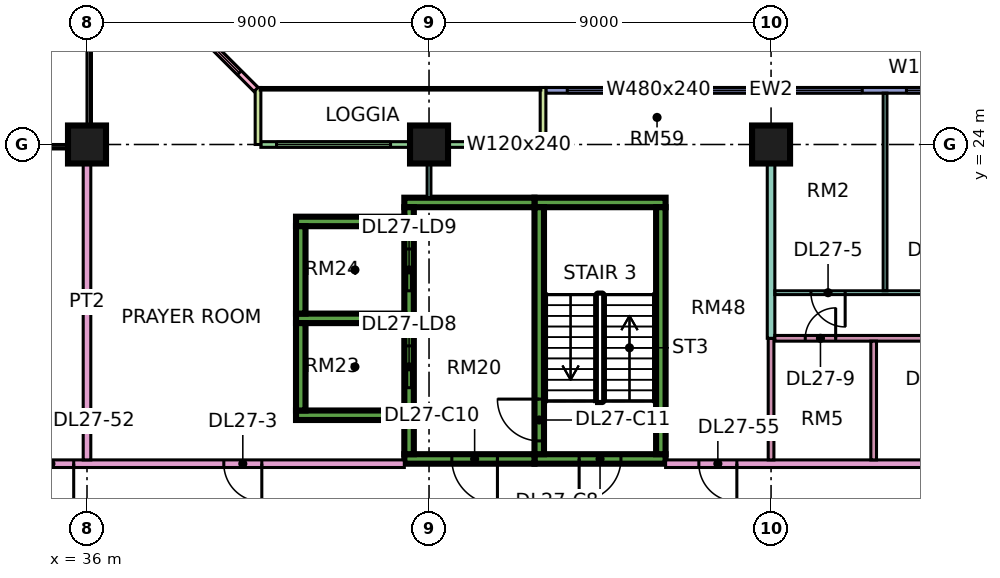
"""IFC4 building model, lengths in metres.
Left out: names, types, materials, properties, quantities, classifications, styles, units other than length and angle.
Written with IfcOpenShell. Run it as: python <this file> out.ifc"""

import sys

from ifc_helpers import new_model, si_unit, direction, frame, frame_2d, origin, origin_2d, place, context, subcontext, project, spatial, rectangle, extrude, element, fill, save


model = new_model("IFC4")
c1 = context("Model", 3, precision=1e-05, world=origin(), true_north=direction((0.0, 1.0)))
c2 = subcontext(c1, "Body", "Model", "MODEL_VIEW")
j1 = project(units=[si_unit("LENGTHUNIT", "METRE"), si_unit("PLANEANGLEUNIT", "RADIAN")], contexts=[c1])
p1 = place(None, origin())
s1 = spatial("IfcSite", under=j1, at=p1, CompositionType="ELEMENT")
p2 = place(p1, origin())
s2 = spatial("IfcBuilding", under=s1, at=p2, CompositionType="ELEMENT")
p3 = place(p2, frame((0.0, 0.0, 118.15)))
s3 = spatial("IfcBuildingStorey", under=s2, at=p3, CompositionType="ELEMENT", Elevation=118.15)
for number, where, z_axis, x_axis in (
    (1, (36.0, 24.0, 0.0), (0.0, 0.0, 1.0), (1.0, 0.0, 0.0)),
    (2, (45.0, 24.0, 0.0), (0.0, 0.0, 1.0), (1.0, 0.0, 0.0)),
    (3, (54.0, 24.0, 0.0), (0.0, 0.0, 1.0), (1.0, 0.0, 0.0)),
):
    element("IfcColumn", number, at=place(p3, frame(where, z_axis=z_axis, x_axis=x_axis)), inside=s3, PredefinedType="COLUMN", context=c2, shape_type="SweptSolid", body=[
        extrude(rectangle(XDim=1.0, YDim=1.0, at=origin_2d()), origin(), (0.0, 0.0, 1.0), 3.75),
    ])
p4 = place(p3, frame((47.775, 15.725, 0.0), z_axis=(0.0, 0.0, 1.0), x_axis=(1.0, 0.0, 0.0)))
e4 = element("IfcWall", 4, at=p4, inside=s3, PredefinedType="SHEAR", context=c2, shape_type="SweptSolid", body=[
    extrude(rectangle(XDim=3.45, YDim=0.25, at=frame_2d((1.725, 0.0))), origin(), (0.0, 0.0, 1.0), 3.75),
])
p5 = place(p4, frame((1.175, 0.0, 0.0)))
e5 = element("IfcOpeningElement", 5, at=p5, cuts=e4, PredefinedType="OPENING", context=c2, shape_type="SweptSolid", body=[
    extrude(rectangle(XDim=1.1, YDim=2.2, at=frame_2d((0.55, 1.1))), frame((0.0, 0.135, 0.0), z_axis=(0.0, -1.0, 0.0), x_axis=(1.0, 0.0, 0.0)), (0.0, 0.0, 1.0), 0.27),
])
p6 = place(p3, frame((47.775, 22.475, 0.0), z_axis=(0.0, 0.0, 1.0), x_axis=(1.0, 0.0, 0.0)))
e6 = element("IfcWall", 6, at=p6, inside=s3, PredefinedType="SHEAR", context=c2, shape_type="SweptSolid", body=[
    extrude(rectangle(XDim=3.45, YDim=0.25, at=frame_2d((1.725, 0.0))), origin(), (0.0, 0.0, 1.0), 3.75),
])
p7 = place(p3, frame((47.9, 15.85, 0.0), z_axis=(0.0, 0.0, 1.0), x_axis=(0.0, 1.0, 0.0)))
e7 = element("IfcWall", 7, at=p7, inside=s3, PredefinedType="SHEAR", context=c2, shape_type="SweptSolid", body=[
    extrude(rectangle(XDim=6.5, YDim=0.25, at=frame_2d((3.25, 0.0))), origin(), (0.0, 0.0, 1.0), 3.75),
])
p8 = place(p7, frame((0.35, 0.0, 0.0)))
e8 = element("IfcOpeningElement", 8, at=p8, cuts=e7, PredefinedType="OPENING", context=c2, shape_type="SweptSolid", body=[
    extrude(rectangle(XDim=1.1, YDim=2.2, at=frame_2d((0.55, 1.1))), frame((0.0, 0.135, 0.0), z_axis=(0.0, -1.0, 0.0), x_axis=(1.0, 0.0, 0.0)), (0.0, 0.0, 1.0), 0.27),
])
p9 = place(p3, frame((51.1, 15.85, 0.0), z_axis=(0.0, 0.0, 1.0), x_axis=(0.0, 1.0, 0.0)))
e9 = element("IfcWall", 9, at=p9, inside=s3, PredefinedType="SHEAR", context=c2, shape_type="SweptSolid", body=[
    extrude(rectangle(XDim=6.5, YDim=0.25, at=frame_2d((3.25, 0.0))), origin(), (0.0, 0.0, 1.0), 3.75),
])
p10 = place(p3, frame((44.35, 15.725, 0.0), z_axis=(0.0, 0.0, 1.0), x_axis=(1.0, 0.0, 0.0)))
e10 = element("IfcWall", 10, at=p10, inside=s3, PredefinedType="SHEAR", context=c2, shape_type="SweptSolid", body=[
    extrude(rectangle(XDim=3.425, YDim=0.25, at=frame_2d((1.712, 0.0))), origin(), (0.0, 0.0, 1.0), 3.75),
])
p11 = place(p10, frame((1.25, 0.0, 0.0)))
e11 = element("IfcOpeningElement", 11, at=p11, cuts=e10, PredefinedType="OPENING", context=c2, shape_type="SweptSolid", body=[
    extrude(rectangle(XDim=1.2, YDim=2.2, at=frame_2d((0.6, 1.1))), frame((0.0, 0.135, 0.0), z_axis=(0.0, -1.0, 0.0), x_axis=(1.0, 0.0, 0.0)), (0.0, 0.0, 1.0), 0.27),
])
p12 = place(p3, frame((44.35, 22.475, 0.0), z_axis=(0.0, 0.0, 1.0), x_axis=(1.0, 0.0, 0.0)))
e12 = element("IfcWall", 12, at=p12, inside=s3, PredefinedType="SHEAR", context=c2, shape_type="SweptSolid", body=[
    extrude(rectangle(XDim=3.425, YDim=0.25, at=frame_2d((1.712, 0.0))), origin(), (0.0, 0.0, 1.0), 3.75),
])
p13 = place(p3, frame((44.475, 15.85, 0.0), z_axis=(0.0, 0.0, 1.0), x_axis=(0.0, 1.0, 0.0)))
e13 = element("IfcWall", 13, at=p13, inside=s3, PredefinedType="SHEAR", context=c2, shape_type="SweptSolid", body=[
    extrude(rectangle(XDim=6.5, YDim=0.25, at=frame_2d((3.25, 0.0))), origin(), (0.0, 0.0, 1.0), 3.75),
])
p14 = place(p13, frame((1.75, 0.0, 0.0)))
e14 = element("IfcOpeningElement", 14, at=p14, cuts=e13, PredefinedType="OPENING", context=c2, shape_type="SweptSolid", body=[
    extrude(rectangle(XDim=1.1, YDim=2.2, at=frame_2d((0.55, 1.1))), frame((0.0, 0.135, 0.0), z_axis=(0.0, -1.0, 0.0), x_axis=(1.0, 0.0, 0.0)), (0.0, 0.0, 1.0), 0.27),
])
p15 = place(p13, frame((4.3, 0.0, 0.0)))
e15 = element("IfcOpeningElement", 15, at=p15, cuts=e13, PredefinedType="OPENING", context=c2, shape_type="SweptSolid", body=[
    extrude(rectangle(XDim=1.1, YDim=2.2, at=frame_2d((0.55, 1.1))), frame((0.0, 0.135, 0.0), z_axis=(0.0, -1.0, 0.0), x_axis=(1.0, 0.0, 0.0)), (0.0, 0.0, 1.0), 0.27),
])
for number, where, z_axis, x_axis in (
    (16, (41.5, 16.875, 0.0), (0.0, 0.0, 1.0), (1.0, 0.0, 0.0)),
    (17, (41.5, 19.425, 0.0), (0.0, 0.0, 1.0), (1.0, 0.0, 0.0)),
    (18, (41.5, 21.975, 0.0), (0.0, 0.0, 1.0), (1.0, 0.0, 0.0)),
):
    element("IfcWall", number, at=place(p3, frame(where, z_axis=z_axis, x_axis=x_axis)), inside=s3, PredefinedType="SHEAR", context=c2, shape_type="SweptSolid", body=[
        extrude(rectangle(XDim=2.85, YDim=0.25, at=frame_2d((1.425, 0.0))), origin(), (0.0, 0.0, 1.0), 3.75),
    ])
for number, where, z_axis, x_axis in (
    (19, (41.625, 17.0, 0.0), (0.0, 0.0, 1.0), (0.0, 1.0, 0.0)),
    (20, (41.625, 19.55, 0.0), (0.0, 0.0, 1.0), (0.0, 1.0, 0.0)),
):
    element("IfcWall", number, at=place(p3, frame(where, z_axis=z_axis, x_axis=x_axis)), inside=s3, PredefinedType="SHEAR", context=c2, shape_type="SweptSolid", body=[
        extrude(rectangle(XDim=2.3, YDim=0.25, at=frame_2d((1.15, 0.0))), origin(), (0.0, 0.0, 1.0), 3.75),
    ])
p16 = place(p3, frame((59.925, 25.425, 0.0), z_axis=(0.0, 0.0, 1.0), x_axis=(-1.0, 0.0, 0.0)))
e21 = element("IfcWall", 21, at=p16, inside=s3, PredefinedType="SOLIDWALL", context=c2, shape_type="SweptSolid", body=[
    extrude(rectangle(XDim=11.85, YDim=0.15, at=frame_2d((5.925, 0.0))), origin(), (0.0, 0.0, 1.0), 3.35),
])
p17 = place(p16, frame((0.562, 0.0, 0.45)))
e22 = element("IfcOpeningElement", 22, at=p17, cuts=e21, PredefinedType="OPENING", context=c2, shape_type="SweptSolid", body=[
    extrude(rectangle(XDim=1.8, YDim=2.4, at=frame_2d((0.9, 1.2))), frame((0.0, 0.085, 0.0), z_axis=(0.0, -1.0, 0.0), x_axis=(1.0, 0.0, 0.0)), (0.0, 0.0, 1.0), 0.17),
])
p18 = place(p16, frame((3.525, 0.0, 0.45)))
e23 = element("IfcOpeningElement", 23, at=p18, cuts=e21, PredefinedType="OPENING", context=c2, shape_type="SweptSolid", body=[
    extrude(rectangle(XDim=1.8, YDim=2.4, at=frame_2d((0.9, 1.2))), frame((0.0, 0.085, 0.0), z_axis=(0.0, -1.0, 0.0), x_axis=(1.0, 0.0, 0.0)), (0.0, 0.0, 1.0), 0.17),
])
p19 = place(p16, frame((6.488, 0.0, 0.45)))
e24 = element("IfcOpeningElement", 24, at=p19, cuts=e21, PredefinedType="OPENING", context=c2, shape_type="SweptSolid", body=[
    extrude(rectangle(XDim=4.8, YDim=2.4, at=frame_2d((2.4, 1.2))), frame((0.0, 0.085, 0.0), z_axis=(0.0, -1.0, 0.0), x_axis=(1.0, 0.0, 0.0)), (0.0, 0.0, 1.0), 0.17),
])
p20 = place(p3, frame((47.925, 24.0, 0.0), z_axis=(0.0, 0.0, 1.0), x_axis=(-1.0, 0.0, 0.0)))
e25 = element("IfcWall", 25, at=p20, inside=s3, PredefinedType="SOLIDWALL", context=c2, shape_type="SweptSolid", body=[
    extrude(rectangle(XDim=7.35, YDim=0.15, at=frame_2d((3.675, 0.0))), origin(), (0.0, 0.0, 1.0), 3.35),
])
p21 = place(p20, frame((0.562, 0.0, 0.45)))
e26 = element("IfcOpeningElement", 26, at=p21, cuts=e25, PredefinedType="OPENING", context=c2, shape_type="SweptSolid", body=[
    extrude(rectangle(XDim=1.2, YDim=2.4, at=frame_2d((0.6, 1.2))), frame((0.0, 0.085, 0.0), z_axis=(0.0, -1.0, 0.0), x_axis=(1.0, 0.0, 0.0)), (0.0, 0.0, 1.0), 0.17),
])
p22 = place(p20, frame((3.938, 0.0, 0.45)))
e27 = element("IfcOpeningElement", 27, at=p22, cuts=e25, PredefinedType="OPENING", context=c2, shape_type="SweptSolid", body=[
    extrude(rectangle(XDim=3.0, YDim=2.4, at=frame_2d((1.5, 1.2))), frame((0.0, 0.085, 0.0), z_axis=(0.0, -1.0, 0.0), x_axis=(1.0, 0.0, 0.0)), (0.0, 0.0, 1.0), 0.17),
])
for number, where, z_axis, x_axis in (
    (28, (48.0, 25.5, 0.0), (0.0, 0.0, 1.0), (0.0, -1.0, 0.0)),
    (29, (40.5, 25.5, 0.0), (0.0, 0.0, 1.0), (0.0, -1.0, 0.0)),
):
    element("IfcWall", number, at=place(p3, frame(where, z_axis=z_axis, x_axis=x_axis)), inside=s3, PredefinedType="SOLIDWALL", context=c2, shape_type="SweptSolid", body=[
        extrude(rectangle(XDim=1.5, YDim=0.15, at=frame_2d((0.75, 0.0))), origin(), (0.0, 0.0, 1.0), 3.35),
    ])
p23 = place(p3, frame((40.447, 25.447, 0.0), z_axis=(0.0, 0.0, 1.0), x_axis=(-0.707106781187, 0.707106781187, 0.0)))
e30 = element("IfcWall", 30, at=p23, inside=s3, PredefinedType="SOLIDWALL", context=c2, shape_type="SweptSolid", body=[
    extrude(rectangle(XDim=4.243, YDim=0.15, at=frame_2d((2.121, 0.0))), origin(), (0.0, 0.0, 1.0), 3.35),
])
p24 = place(p23, frame((0.621, 0.0, 0.45)))
e31 = element("IfcOpeningElement", 31, at=p24, cuts=e30, PredefinedType="OPENING", context=c2, shape_type="SweptSolid", body=[
    extrude(rectangle(XDim=3.0, YDim=2.4, at=frame_2d((1.5, 1.2))), frame((0.0, 0.085, 0.0), z_axis=(0.0, -1.0, 0.0), x_axis=(1.0, 0.0, 0.0)), (0.0, 0.0, 1.0), 0.17),
])
p25 = place(p3, frame((34.0, 15.6, 0.0), z_axis=(0.0, 0.0, 1.0), x_axis=(1.0, 0.0, 0.0)))
e32 = element("IfcWall", 32, at=p25, inside=s3, PredefinedType="PARTITIONING", context=c2, shape_type="SweptSolid", body=[
    extrude(rectangle(XDim=10.35, YDim=0.2, at=frame_2d((5.175, 0.0))), origin(), (0.0, 0.0, 1.0), 3.35),
])
p26 = place(p25, frame((5.6, 0.0, 0.0)))
e33 = element("IfcOpeningElement", 33, at=p26, cuts=e32, PredefinedType="OPENING", context=c2, shape_type="SweptSolid", body=[
    extrude(rectangle(XDim=1.0, YDim=2.1, at=frame_2d((0.5, 1.05))), frame((0.0, 0.11, 0.0), z_axis=(0.0, -1.0, 0.0), x_axis=(1.0, 0.0, 0.0)), (0.0, 0.0, 1.0), 0.22),
])
p27 = place(p25, frame((0.45, 0.0, 0.0)))
e34 = element("IfcOpeningElement", 34, at=p27, cuts=e32, PredefinedType="OPENING", context=c2, shape_type="SweptSolid", body=[
    extrude(rectangle(XDim=1.2, YDim=2.1, at=frame_2d((0.6, 1.05))), frame((0.0, 0.11, 0.0), z_axis=(0.0, -1.0, 0.0), x_axis=(1.0, 0.0, 0.0)), (0.0, 0.0, 1.0), 0.22),
])
p28 = place(p3, frame((36.0, 15.7, 0.0), z_axis=(0.0, 0.0, 1.0), x_axis=(0.0, 1.0, 0.0)))
e35 = element("IfcWall", 35, at=p28, inside=s3, PredefinedType="PARTITIONING", context=c2, shape_type="SweptSolid", body=[
    extrude(rectangle(XDim=8.3, YDim=0.2, at=frame_2d((4.15, 0.0))), origin(), (0.0, 0.0, 1.0), 3.35),
])
p29 = place(p3, frame((45.0, 22.6, 0.0), z_axis=(0.0, 0.0, 1.0), x_axis=(0.0, 1.0, 0.0)))
e36 = element("IfcWall", 36, at=p29, inside=s3, PredefinedType="PARTITIONING", context=c2, shape_type="SweptSolid", body=[
    extrude(rectangle(XDim=1.326, YDim=0.1, at=frame_2d((0.663, 0.0))), origin(), (0.0, 0.0, 1.0), 3.35),
])
p30 = place(p3, frame((51.225, 15.6, 0.0), z_axis=(0.0, 0.0, 1.0), x_axis=(1.0, 0.0, 0.0)))
e37 = element("IfcWall", 37, at=p30, inside=s3, PredefinedType="PARTITIONING", context=c2, shape_type="SweptSolid", body=[
    extrude(rectangle(XDim=20.701, YDim=0.2, at=frame_2d((10.351, 0.0))), origin(), (0.0, 0.0, 1.0), 3.35),
])
p31 = place(p30, frame((9.725, 0.0, 0.0)))
e38 = element("IfcOpeningElement", 38, at=p31, cuts=e37, PredefinedType="OPENING", context=c2, shape_type="SweptSolid", body=[
    extrude(rectangle(XDim=1.0, YDim=2.1, at=frame_2d((0.5, 1.05))), frame((0.0, 0.11, 0.0), z_axis=(0.0, -1.0, 0.0), x_axis=(1.0, 0.0, 0.0)), (0.0, 0.0, 1.0), 0.22),
])
p32 = place(p30, frame((0.875, 0.0, 0.0)))
e39 = element("IfcOpeningElement", 39, at=p32, cuts=e37, PredefinedType="OPENING", context=c2, shape_type="SweptSolid", body=[
    extrude(rectangle(XDim=1.0, YDim=2.1, at=frame_2d((0.5, 1.05))), frame((0.0, 0.11, 0.0), z_axis=(0.0, -1.0, 0.0), x_axis=(1.0, 0.0, 0.0)), (0.0, 0.0, 1.0), 0.22),
])
p33 = place(p3, frame((54.0, 15.7, 0.0), z_axis=(0.0, 0.0, 1.0), x_axis=(0.0, 1.0, 0.0)))
e40 = element("IfcWall", 40, at=p33, inside=s3, PredefinedType="PARTITIONING", context=c2, shape_type="SweptSolid", body=[
    extrude(rectangle(XDim=3.2, YDim=0.15, at=frame_2d((1.6, 0.0))), origin(), (0.0, 0.0, 1.0), 3.35),
])
p34 = place(p3, frame((54.0, 18.9, 0.0), z_axis=(0.0, 0.0, 1.0), x_axis=(0.0, 1.0, 0.0)))
e41 = element("IfcWall", 41, at=p34, inside=s3, PredefinedType="PARTITIONING", context=c2, shape_type="SweptSolid", body=[
    extrude(rectangle(XDim=5.1, YDim=0.2, at=frame_2d((2.55, 0.0))), origin(), (0.0, 0.0, 1.0), 3.35),
])
p35 = place(p3, frame((54.1, 18.9, 0.0), z_axis=(0.0, 0.0, 1.0), x_axis=(1.0, 0.0, 0.0)))
e42 = element("IfcWall", 42, at=p35, inside=s3, PredefinedType="PARTITIONING", context=c2, shape_type="SweptSolid", body=[
    extrude(rectangle(XDim=6.275, YDim=0.15, at=frame_2d((3.137, 0.0))), origin(), (0.0, 0.0, 1.0), 3.35),
])
p36 = place(p35, frame((3.95, 0.0, 0.0)))
e43 = element("IfcOpeningElement", 43, at=p36, cuts=e42, PredefinedType="OPENING", context=c2, shape_type="SweptSolid", body=[
    extrude(rectangle(XDim=0.8, YDim=2.1, at=frame_2d((0.4, 1.05))), frame((0.0, 0.085, 0.0), z_axis=(0.0, -1.0, 0.0), x_axis=(1.0, 0.0, 0.0)), (0.0, 0.0, 1.0), 0.17),
])
p37 = place(p35, frame((0.8, 0.0, 0.0)))
e44 = element("IfcOpeningElement", 44, at=p37, cuts=e42, PredefinedType="OPENING", context=c2, shape_type="SweptSolid", body=[
    extrude(rectangle(XDim=0.8, YDim=2.1, at=frame_2d((0.4, 1.05))), frame((0.0, 0.085, 0.0), z_axis=(0.0, -1.0, 0.0), x_axis=(1.0, 0.0, 0.0)), (0.0, 0.0, 1.0), 0.17),
])
p38 = place(p3, frame((54.1, 20.1, 0.0), z_axis=(0.0, 0.0, 1.0), x_axis=(1.0, 0.0, 0.0)))
e45 = element("IfcWall", 45, at=p38, inside=s3, PredefinedType="PARTITIONING", context=c2, shape_type="SweptSolid", body=[
    extrude(rectangle(XDim=11.95, YDim=0.1, at=frame_2d((5.975, 0.0))), origin(), (0.0, 0.0, 1.0), 3.35),
])
p39 = place(p38, frame((0.95, 0.0, 0.0)))
e46 = element("IfcOpeningElement", 46, at=p39, cuts=e45, PredefinedType="OPENING", context=c2, shape_type="SweptSolid", body=[
    extrude(rectangle(XDim=0.9, YDim=2.1, at=frame_2d((0.45, 1.05))), frame((0.0, 0.06, 0.0), z_axis=(0.0, -1.0, 0.0), x_axis=(1.0, 0.0, 0.0)), (0.0, 0.0, 1.0), 0.12),
])
p40 = place(p38, frame((3.95, 0.0, 0.0)))
e47 = element("IfcOpeningElement", 47, at=p40, cuts=e45, PredefinedType="OPENING", context=c2, shape_type="SweptSolid", body=[
    extrude(rectangle(XDim=0.9, YDim=2.1, at=frame_2d((0.45, 1.05))), frame((0.0, 0.06, 0.0), z_axis=(0.0, -1.0, 0.0), x_axis=(1.0, 0.0, 0.0)), (0.0, 0.0, 1.0), 0.12),
])
p41 = place(p38, frame((6.95, 0.0, 0.0)))
e48 = element("IfcOpeningElement", 48, at=p41, cuts=e45, PredefinedType="OPENING", context=c2, shape_type="SweptSolid", body=[
    extrude(rectangle(XDim=0.9, YDim=2.1, at=frame_2d((0.45, 1.05))), frame((0.0, 0.06, 0.0), z_axis=(0.0, -1.0, 0.0), x_axis=(1.0, 0.0, 0.0)), (0.0, 0.0, 1.0), 0.12),
])
p42 = place(p38, frame((9.95, 0.0, 0.0)))
e49 = element("IfcOpeningElement", 49, at=p42, cuts=e45, PredefinedType="OPENING", context=c2, shape_type="SweptSolid", body=[
    extrude(rectangle(XDim=0.9, YDim=2.1, at=frame_2d((0.45, 1.05))), frame((0.0, 0.06, 0.0), z_axis=(0.0, -1.0, 0.0), x_axis=(1.0, 0.0, 0.0)), (0.0, 0.0, 1.0), 0.12),
])
p43 = place(p3, frame((56.7, 15.7, 0.0), z_axis=(0.0, 0.0, 1.0), x_axis=(0.0, 1.0, 0.0)))
e50 = element("IfcWall", 50, at=p43, inside=s3, PredefinedType="PARTITIONING", context=c2, shape_type="SweptSolid", body=[
    extrude(rectangle(XDim=3.125, YDim=0.15, at=frame_2d((1.562, 0.0))), origin(), (0.0, 0.0, 1.0), 3.35),
])
p44 = place(p3, frame((57.0, 20.15, 0.0), z_axis=(0.0, 0.0, 1.0), x_axis=(0.0, 1.0, 0.0)))
e51 = element("IfcWall", 51, at=p44, inside=s3, PredefinedType="PARTITIONING", context=c2, shape_type="SweptSolid", body=[
    extrude(rectangle(XDim=5.201, YDim=0.1, at=frame_2d((2.601, 0.0))), origin(), (0.0, 0.0, 1.0), 3.35),
])
p45 = place(p17, origin())
e52 = element("IfcWindow", 52, at=p45, inside=s3, PartitioningType="SINGLE_PANEL", PredefinedType="WINDOW", context=c2, shape_type="SweptSolid", body=[
    extrude(rectangle(XDim=1.8, YDim=2.4, at=frame_2d((0.9, 1.2))), frame((0.0, 0.03, 0.0), z_axis=(0.0, -1.0, 0.0), x_axis=(1.0, 0.0, 0.0)), (0.0, 0.0, 1.0), 0.06),
])
fill(e22, e52)
p46 = place(p18, origin())
e53 = element("IfcWindow", 53, at=p46, inside=s3, PartitioningType="SINGLE_PANEL", PredefinedType="WINDOW", context=c2, shape_type="SweptSolid", body=[
    extrude(rectangle(XDim=1.8, YDim=2.4, at=frame_2d((0.9, 1.2))), frame((0.0, 0.03, 0.0), z_axis=(0.0, -1.0, 0.0), x_axis=(1.0, 0.0, 0.0)), (0.0, 0.0, 1.0), 0.06),
])
fill(e23, e53)
p47 = place(p19, origin())
e54 = element("IfcWindow", 54, at=p47, inside=s3, PartitioningType="SINGLE_PANEL", PredefinedType="WINDOW", context=c2, shape_type="SweptSolid", body=[
    extrude(rectangle(XDim=4.8, YDim=2.4, at=frame_2d((2.4, 1.2))), frame((0.0, 0.03, 0.0), z_axis=(0.0, -1.0, 0.0), x_axis=(1.0, 0.0, 0.0)), (0.0, 0.0, 1.0), 0.06),
])
fill(e24, e54)
p48 = place(p21, origin())
e55 = element("IfcWindow", 55, at=p48, inside=s3, PartitioningType="SINGLE_PANEL", PredefinedType="WINDOW", context=c2, shape_type="SweptSolid", body=[
    extrude(rectangle(XDim=1.2, YDim=2.4, at=frame_2d((0.6, 1.2))), frame((0.0, 0.03, 0.0), z_axis=(0.0, -1.0, 0.0), x_axis=(1.0, 0.0, 0.0)), (0.0, 0.0, 1.0), 0.06),
])
fill(e26, e55)
p49 = place(p22, origin())
e56 = element("IfcWindow", 56, at=p49, inside=s3, PartitioningType="SINGLE_PANEL", PredefinedType="WINDOW", context=c2, shape_type="SweptSolid", body=[
    extrude(rectangle(XDim=3.0, YDim=2.4, at=frame_2d((1.5, 1.2))), frame((0.0, 0.03, 0.0), z_axis=(0.0, -1.0, 0.0), x_axis=(1.0, 0.0, 0.0)), (0.0, 0.0, 1.0), 0.06),
])
fill(e27, e56)
p50 = place(p24, origin())
e57 = element("IfcWindow", 57, at=p50, inside=s3, PartitioningType="SINGLE_PANEL", PredefinedType="WINDOW", context=c2, shape_type="SweptSolid", body=[
    extrude(rectangle(XDim=3.0, YDim=2.4, at=frame_2d((1.5, 1.2))), frame((0.0, 0.03, 0.0), z_axis=(0.0, -1.0, 0.0), x_axis=(1.0, 0.0, 0.0)), (0.0, 0.0, 1.0), 0.06),
])
fill(e31, e57)
p51 = place(p5, frame((1.1, 0.0, 0.0), z_axis=(0.0, 0.0, 1.0), x_axis=(-1.0, 0.0, 0.0)))
e58 = element("IfcDoor", 58, at=p51, inside=s3, OperationType="SINGLE_SWING_LEFT", PredefinedType="DOOR", context=c2, shape_type="SweptSolid", body=[
    extrude(rectangle(XDim=1.1, YDim=2.2, at=frame_2d((0.55, 1.1))), frame((0.0, 0.025, 0.0), z_axis=(0.0, -1.0, 0.0), x_axis=(1.0, 0.0, 0.0)), (0.0, 0.0, 1.0), 0.05),
])
fill(e5, e58)
p52 = place(p11, origin())
e59 = element("IfcDoor", 59, at=p52, inside=s3, OperationType="SINGLE_SWING_RIGHT", PredefinedType="DOOR", context=c2, shape_type="SweptSolid", body=[
    extrude(rectangle(XDim=1.2, YDim=2.2, at=frame_2d((0.6, 1.1))), frame((0.0, 0.025, 0.0), z_axis=(0.0, -1.0, 0.0), x_axis=(1.0, 0.0, 0.0)), (0.0, 0.0, 1.0), 0.05),
])
fill(e11, e59)
p53 = place(p8, frame((1.1, 0.0, 0.0), z_axis=(0.0, 0.0, 1.0), x_axis=(-1.0, 0.0, 0.0)))
e60 = element("IfcDoor", 60, at=p53, inside=s3, OperationType="SINGLE_SWING_RIGHT", PredefinedType="DOOR", context=c2, shape_type="SweptSolid", body=[
    extrude(rectangle(XDim=1.1, YDim=2.2, at=frame_2d((0.55, 1.1))), frame((0.0, 0.025, 0.0), z_axis=(0.0, -1.0, 0.0), x_axis=(1.0, 0.0, 0.0)), (0.0, 0.0, 1.0), 0.05),
])
fill(e8, e60)
p54 = place(p14, origin())
e61 = element("IfcDoor", 61, at=p54, inside=s3, OperationType="DOUBLE_DOOR_SLIDING", PredefinedType="DOOR", context=c2, shape_type="SweptSolid", body=[
    extrude(rectangle(XDim=1.1, YDim=2.2, at=frame_2d((0.55, 1.1))), frame((0.0, 0.025, 0.0), z_axis=(0.0, -1.0, 0.0), x_axis=(1.0, 0.0, 0.0)), (0.0, 0.0, 1.0), 0.05),
])
fill(e14, e61)
p55 = place(p15, origin())
e62 = element("IfcDoor", 62, at=p55, inside=s3, OperationType="DOUBLE_DOOR_SLIDING", PredefinedType="DOOR", context=c2, shape_type="SweptSolid", body=[
    extrude(rectangle(XDim=1.1, YDim=2.2, at=frame_2d((0.55, 1.1))), frame((0.0, 0.025, 0.0), z_axis=(0.0, -1.0, 0.0), x_axis=(1.0, 0.0, 0.0)), (0.0, 0.0, 1.0), 0.05),
])
fill(e15, e62)
p56 = place(p26, origin())
e63 = element("IfcDoor", 63, at=p56, inside=s3, OperationType="SINGLE_SWING_RIGHT", PredefinedType="DOOR", context=c2, shape_type="SweptSolid", body=[
    extrude(rectangle(XDim=1.0, YDim=2.1, at=frame_2d((0.5, 1.05))), frame((0.0, 0.025, 0.0), z_axis=(0.0, -1.0, 0.0), x_axis=(1.0, 0.0, 0.0)), (0.0, 0.0, 1.0), 0.05),
])
fill(e33, e63)
p57 = place(p39, origin())
e64 = element("IfcDoor", 64, at=p57, inside=s3, OperationType="SINGLE_SWING_RIGHT", PredefinedType="DOOR", context=c2, shape_type="SweptSolid", body=[
    extrude(rectangle(XDim=0.9, YDim=2.1, at=frame_2d((0.45, 1.05))), frame((0.0, 0.025, 0.0), z_axis=(0.0, -1.0, 0.0), x_axis=(1.0, 0.0, 0.0)), (0.0, 0.0, 1.0), 0.05),
])
fill(e46, e64)
p58 = place(p37, frame((0.8, 0.0, 0.0), z_axis=(0.0, 0.0, 1.0), x_axis=(-1.0, 0.0, 0.0)))
e65 = element("IfcDoor", 65, at=p58, inside=s3, OperationType="SINGLE_SWING_RIGHT", PredefinedType="DOOR", context=c2, shape_type="SweptSolid", body=[
    extrude(rectangle(XDim=0.8, YDim=2.1, at=frame_2d((0.4, 1.05))), frame((0.0, 0.025, 0.0), z_axis=(0.0, -1.0, 0.0), x_axis=(1.0, 0.0, 0.0)), (0.0, 0.0, 1.0), 0.05),
])
fill(e44, e65)
p59 = place(p27, origin())
e66 = element("IfcDoor", 66, at=p59, inside=s3, OperationType="SINGLE_SWING_RIGHT", PredefinedType="DOOR", context=c2, shape_type="SweptSolid", body=[
    extrude(rectangle(XDim=1.2, YDim=2.1, at=frame_2d((0.6, 1.05))), frame((0.0, 0.025, 0.0), z_axis=(0.0, -1.0, 0.0), x_axis=(1.0, 0.0, 0.0)), (0.0, 0.0, 1.0), 0.05),
])
fill(e34, e66)
p60 = place(p32, origin())
e67 = element("IfcDoor", 67, at=p60, inside=s3, OperationType="SINGLE_SWING_RIGHT", PredefinedType="DOOR", context=c2, shape_type="SweptSolid", body=[
    extrude(rectangle(XDim=1.0, YDim=2.1, at=frame_2d((0.5, 1.05))), frame((0.0, 0.025, 0.0), z_axis=(0.0, -1.0, 0.0), x_axis=(1.0, 0.0, 0.0)), (0.0, 0.0, 1.0), 0.05),
])
fill(e39, e67)
save(model, sys.argv[1])
